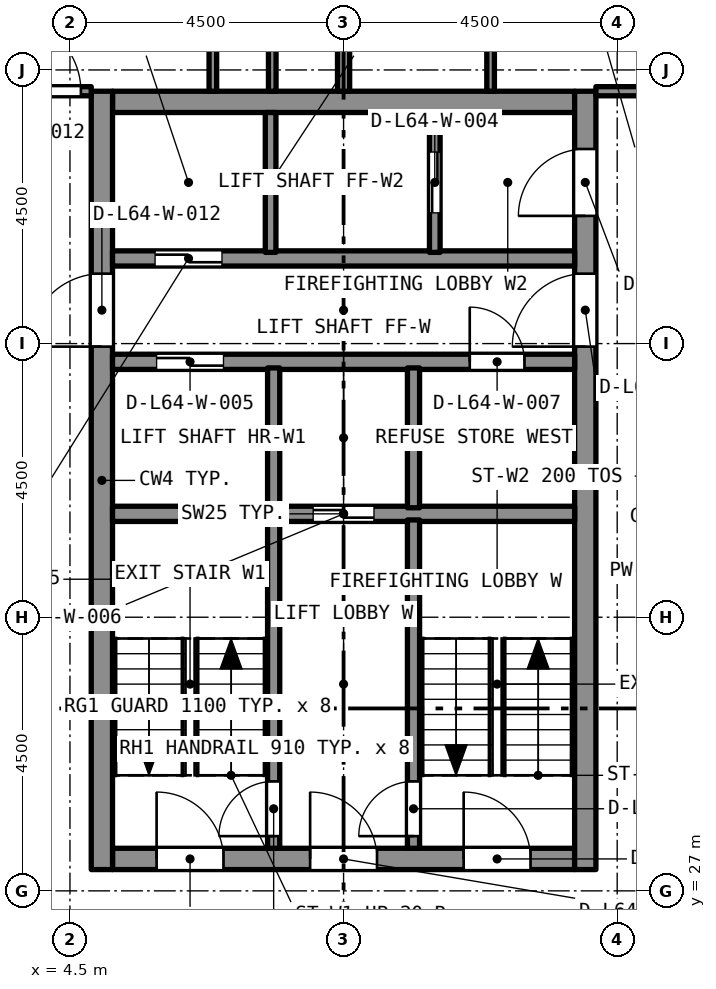
"""IFC4 building model, lengths in metres.
Left out: names, types, materials, properties, quantities, classifications, styles, units other than length and angle.
Written with IfcOpenShell. Run it as: python <this file> out.ifc"""

import sys

from ifc_helpers import new_model, si_unit, direction, frame, frame_2d, origin, place, context, subcontext, project, spatial, rectangle, extrude, element, fill, save


model = new_model("IFC4")
c1 = context("Model", 3, precision=1e-05, world=origin(), true_north=direction((0.0, 1.0)))
c2 = subcontext(c1, "Body", "Model", "MODEL_VIEW")
j1 = project(units=[si_unit("LENGTHUNIT", "METRE"), si_unit("PLANEANGLEUNIT", "RADIAN")], contexts=[c1])
p1 = place(None, origin())
s1 = spatial("IfcSite", under=j1, at=p1, CompositionType="ELEMENT")
p2 = place(p1, origin())
s2 = spatial("IfcBuilding", under=s1, at=p2, CompositionType="ELEMENT")
p3 = place(p2, frame((0.0, 0.0, 229.295)))
s3 = spatial("IfcBuildingStorey", under=s2, at=p3, CompositionType="ELEMENT", Elevation=229.295)
p4 = place(p3, frame((5.2, 27.525, 0.0), z_axis=(0.0, 0.0, 1.0), x_axis=(1.0, 0.0, 0.0)))
e1 = element("IfcWall", 1, at=p4, inside=s3, PredefinedType="SOLIDWALL", context=c2, shape_type="SweptSolid", body=[
    extrude(rectangle(XDim=7.6, YDim=0.35, at=frame_2d((3.8, 0.0))), origin(), (0.0, 0.0, 1.0), 3.2),
])
p5 = place(p4, frame((0.725, 0.0, 0.0)))
e2 = element("IfcOpeningElement", 2, at=p5, cuts=e1, PredefinedType="OPENING", context=c2, shape_type="SweptSolid", body=[
    extrude(rectangle(XDim=1.1, YDim=2.1, at=frame_2d((0.55, 1.05))), frame((0.0, 0.185, 0.0), z_axis=(0.0, -1.0, 0.0), x_axis=(1.0, 0.0, 0.0)), (0.0, 0.0, 1.0), 0.37),
])
p6 = place(p4, frame((3.25, 0.0, 0.0)))
e3 = element("IfcOpeningElement", 3, at=p6, cuts=e1, PredefinedType="OPENING", context=c2, shape_type="SweptSolid", body=[
    extrude(rectangle(XDim=1.1, YDim=2.1, at=frame_2d((0.55, 1.05))), frame((0.0, 0.185, 0.0), z_axis=(0.0, -1.0, 0.0), x_axis=(1.0, 0.0, 0.0)), (0.0, 0.0, 1.0), 0.37),
])
p7 = place(p4, frame((5.775, 0.0, 0.0)))
e4 = element("IfcOpeningElement", 4, at=p7, cuts=e1, PredefinedType="OPENING", context=c2, shape_type="SweptSolid", body=[
    extrude(rectangle(XDim=1.1, YDim=2.1, at=frame_2d((0.55, 1.05))), frame((0.0, 0.185, 0.0), z_axis=(0.0, -1.0, 0.0), x_axis=(1.0, 0.0, 0.0)), (0.0, 0.0, 1.0), 0.37),
])
p8 = place(p3, frame((5.2, 39.975, 0.0), z_axis=(0.0, 0.0, 1.0), x_axis=(1.0, 0.0, 0.0)))
e5 = element("IfcWall", 5, at=p8, inside=s3, PredefinedType="SOLIDWALL", context=c2, shape_type="SweptSolid", body=[
    extrude(rectangle(XDim=7.6, YDim=0.35, at=frame_2d((3.8, 0.0))), origin(), (0.0, 0.0, 1.0), 3.2),
])
p9 = place(p3, frame((5.025, 27.35, 0.0), z_axis=(0.0, 0.0, 1.0), x_axis=(0.0, 1.0, 0.0)))
e6 = element("IfcWall", 6, at=p9, inside=s3, PredefinedType="SOLIDWALL", context=c2, shape_type="SweptSolid", body=[
    extrude(rectangle(XDim=12.8, YDim=0.35, at=frame_2d((6.4, 0.0))), origin(), (0.0, 0.0, 1.0), 3.2),
])
p10 = place(p9, frame((8.6, 0.0, 0.0)))
e7 = element("IfcOpeningElement", 7, at=p10, cuts=e6, PredefinedType="OPENING", context=c2, shape_type="SweptSolid", body=[
    extrude(rectangle(XDim=1.2, YDim=2.1, at=frame_2d((0.6, 1.05))), frame((0.0, 0.185, 0.0), z_axis=(0.0, -1.0, 0.0), x_axis=(1.0, 0.0, 0.0)), (0.0, 0.0, 1.0), 0.37),
])
p11 = place(p3, frame((12.975, 27.35, 0.0), z_axis=(0.0, 0.0, 1.0), x_axis=(0.0, 1.0, 0.0)))
e8 = element("IfcWall", 8, at=p11, inside=s3, PredefinedType="SOLIDWALL", context=c2, shape_type="SweptSolid", body=[
    extrude(rectangle(XDim=12.8, YDim=0.35, at=frame_2d((6.4, 0.0))), origin(), (0.0, 0.0, 1.0), 3.2),
])
p12 = place(p11, frame((10.75, 0.0, 0.0)))
e9 = element("IfcOpeningElement", 9, at=p12, cuts=e8, PredefinedType="OPENING", context=c2, shape_type="SweptSolid", body=[
    extrude(rectangle(XDim=1.1, YDim=2.1, at=frame_2d((0.55, 1.05))), frame((0.0, 0.185, 0.0), z_axis=(0.0, -1.0, 0.0), x_axis=(1.0, 0.0, 0.0)), (0.0, 0.0, 1.0), 0.37),
])
p13 = place(p11, frame((8.6, 0.0, 0.0)))
e10 = element("IfcOpeningElement", 10, at=p13, cuts=e8, PredefinedType="OPENING", context=c2, shape_type="SweptSolid", body=[
    extrude(rectangle(XDim=1.2, YDim=2.1, at=frame_2d((0.6, 1.05))), frame((0.0, 0.185, 0.0), z_axis=(0.0, -1.0, 0.0), x_axis=(1.0, 0.0, 0.0)), (0.0, 0.0, 1.0), 0.37),
])
p14 = place(p3, frame((6.85, 43.683, 0.0), z_axis=(0.0, 0.0, 1.0), x_axis=(0.0, -1.0, 0.0)))
e11 = element("IfcWall", 11, at=p14, inside=s3, PredefinedType="PARTITIONING", context=c2, shape_type="SweptSolid", body=[
    extrude(rectangle(XDim=3.533, YDim=0.125, at=frame_2d((1.766, 0.0))), origin(), (0.0, 0.0, 1.0), 2.9),
])
p15 = place(p14, frame((0.183, 0.0, 0.0)))
e12 = element("IfcOpeningElement", 12, at=p15, cuts=e11, PredefinedType="OPENING", context=c2, shape_type="SweptSolid", body=[
    extrude(rectangle(XDim=0.8, YDim=2.1, at=frame_2d((0.4, 1.05))), frame((0.0, 0.073, 0.0), z_axis=(0.0, -1.0, 0.0), x_axis=(1.0, 0.0, 0.0)), (0.0, 0.0, 1.0), 0.145),
])
p16 = place(p3, frame((7.827, 40.15, 0.0), z_axis=(0.0, 0.0, 1.0), x_axis=(0.0, 1.0, 0.0)))
e13 = element("IfcWall", 13, at=p16, inside=s3, PredefinedType="PARTITIONING", context=c2, shape_type="SweptSolid", body=[
    extrude(rectangle(XDim=3.408, YDim=0.125, at=frame_2d((1.704, 0.0))), origin(), (0.0, 0.0, 1.0), 2.9),
])
p17 = place(p3, frame((3.35, 40.15, 0.0), z_axis=(0.0, 0.0, 1.0), x_axis=(1.0, 0.0, 0.0)))
e14 = element("IfcWall", 14, at=p17, inside=s3, PredefinedType="PARTITIONING", context=c2, shape_type="SweptSolid", body=[
    extrude(rectangle(XDim=1.5, YDim=0.15, at=frame_2d((0.75, 0.0))), origin(), (0.0, 0.0, 1.0), 2.9),
])
p18 = place(p17, frame((0.13, 0.0, 0.0)))
e15 = element("IfcOpeningElement", 15, at=p18, cuts=e14, PredefinedType="OPENING", context=c2, shape_type="SweptSolid", body=[
    extrude(rectangle(XDim=1.2, YDim=2.4, at=frame_2d((0.6, 1.2))), frame((0.0, 0.085, 0.0), z_axis=(0.0, -1.0, 0.0), x_axis=(1.0, 0.0, 0.0)), (0.0, 0.0, 1.0), 0.17),
])
p19 = place(p3, frame((9.0, 40.15, 0.0), z_axis=(0.0, 0.0, 1.0), x_axis=(0.0, 1.0, 0.0)))
e16 = element("IfcWall", 16, at=p19, inside=s3, PredefinedType="PARTITIONING", context=c2, shape_type="SweptSolid", body=[
    extrude(rectangle(XDim=8.95, YDim=0.2, at=frame_2d((4.475, 0.0))), origin(), (0.0, 0.0, 1.0), 2.9),
])
p20 = place(p3, frame((11.418, 40.15, 0.0), z_axis=(0.0, 0.0, 1.0), x_axis=(0.0, 1.0, 0.0)))
e17 = element("IfcWall", 17, at=p20, inside=s3, PredefinedType="PARTITIONING", context=c2, shape_type="SweptSolid", body=[
    extrude(rectangle(XDim=2.248, YDim=0.125, at=frame_2d((1.124, 0.0))), origin(), (0.0, 0.0, 1.0), 2.9),
])
p21 = place(p3, frame((13.15, 40.15, 0.0), z_axis=(0.0, 0.0, 1.0), x_axis=(1.0, 0.0, 0.0)))
e18 = element("IfcWall", 18, at=p21, inside=s3, PredefinedType="PARTITIONING", context=c2, shape_type="SweptSolid", body=[
    extrude(rectangle(XDim=1.8, YDim=0.15, at=frame_2d((0.9, 0.0))), origin(), (0.0, 0.0, 1.0), 2.9),
])
p22 = place(p3, frame((5.2, 33.2, 0.0), z_axis=(0.0, 0.0, 1.0), x_axis=(1.0, 0.0, 0.0)))
e19 = element("IfcWall", 19, at=p22, inside=s3, PredefinedType="SOLIDWALL", context=c2, shape_type="SweptSolid", body=[
    extrude(rectangle(XDim=7.6, YDim=0.25, at=frame_2d((3.8, 0.0))), origin(), (0.0, 0.0, 1.0), 2.9),
])
p23 = place(p22, frame((3.3, 0.0, 0.0)))
e20 = element("IfcOpeningElement", 20, at=p23, cuts=e19, PredefinedType="OPENING", context=c2, shape_type="SweptSolid", body=[
    extrude(rectangle(XDim=1.0, YDim=2.1, at=frame_2d((0.5, 1.05))), frame((0.0, 0.135, 0.0), z_axis=(0.0, -1.0, 0.0), x_axis=(1.0, 0.0, 0.0)), (0.0, 0.0, 1.0), 0.27),
])
p24 = place(p3, frame((5.2, 35.7, 0.0), z_axis=(0.0, 0.0, 1.0), x_axis=(1.0, 0.0, 0.0)))
e21 = element("IfcWall", 21, at=p24, inside=s3, PredefinedType="SOLIDWALL", context=c2, shape_type="SweptSolid", body=[
    extrude(rectangle(XDim=7.6, YDim=0.25, at=frame_2d((3.8, 0.0))), origin(), (0.0, 0.0, 1.0), 2.9),
])
p25 = place(p24, frame((0.725, 0.0, 0.0)))
e22 = element("IfcOpeningElement", 22, at=p25, cuts=e21, PredefinedType="OPENING", context=c2, shape_type="SweptSolid", body=[
    extrude(rectangle(XDim=1.1, YDim=2.4, at=frame_2d((0.55, 1.2))), frame((0.0, 0.135, 0.0), z_axis=(0.0, -1.0, 0.0), x_axis=(1.0, 0.0, 0.0)), (0.0, 0.0, 1.0), 0.27),
])
p26 = place(p24, frame((5.875, 0.0, 0.0)))
e23 = element("IfcOpeningElement", 23, at=p26, cuts=e21, PredefinedType="OPENING", context=c2, shape_type="SweptSolid", body=[
    extrude(rectangle(XDim=0.9, YDim=2.1, at=frame_2d((0.45, 1.05))), frame((0.0, 0.135, 0.0), z_axis=(0.0, -1.0, 0.0), x_axis=(1.0, 0.0, 0.0)), (0.0, 0.0, 1.0), 0.27),
])
p27 = place(p3, frame((5.2, 37.4, 0.0), z_axis=(0.0, 0.0, 1.0), x_axis=(1.0, 0.0, 0.0)))
e24 = element("IfcWall", 24, at=p27, inside=s3, PredefinedType="SOLIDWALL", context=c2, shape_type="SweptSolid", body=[
    extrude(rectangle(XDim=7.6, YDim=0.25, at=frame_2d((3.8, 0.0))), origin(), (0.0, 0.0, 1.0), 2.9),
])
p28 = place(p27, frame((0.7, 0.0, 0.0)))
e25 = element("IfcOpeningElement", 25, at=p28, cuts=e24, PredefinedType="OPENING", context=c2, shape_type="SweptSolid", body=[
    extrude(rectangle(XDim=1.1, YDim=2.4, at=frame_2d((0.55, 1.2))), frame((0.0, 0.135, 0.0), z_axis=(0.0, -1.0, 0.0), x_axis=(1.0, 0.0, 0.0)), (0.0, 0.0, 1.0), 0.27),
])
p29 = place(p3, frame((7.85, 27.7, 0.0), z_axis=(0.0, 0.0, 1.0), x_axis=(0.0, 1.0, 0.0)))
e26 = element("IfcWall", 26, at=p29, inside=s3, PredefinedType="SOLIDWALL", context=c2, shape_type="SweptSolid", body=[
    extrude(rectangle(XDim=5.4, YDim=0.2, at=frame_2d((2.7, 0.0))), origin(), (0.0, 0.0, 1.0), 2.9),
])
p30 = place(p29, frame((0.2, 0.0, 0.0)))
e27 = element("IfcOpeningElement", 27, at=p30, cuts=e26, PredefinedType="OPENING", context=c2, shape_type="SweptSolid", body=[
    extrude(rectangle(XDim=0.9, YDim=2.1, at=frame_2d((0.45, 1.05))), frame((0.0, 0.11, 0.0), z_axis=(0.0, -1.0, 0.0), x_axis=(1.0, 0.0, 0.0)), (0.0, 0.0, 1.0), 0.22),
])
p31 = place(p3, frame((10.15, 27.7, 0.0), z_axis=(0.0, 0.0, 1.0), x_axis=(0.0, 1.0, 0.0)))
e28 = element("IfcWall", 28, at=p31, inside=s3, PredefinedType="SOLIDWALL", context=c2, shape_type="SweptSolid", body=[
    extrude(rectangle(XDim=5.4, YDim=0.2, at=frame_2d((2.7, 0.0))), origin(), (0.0, 0.0, 1.0), 2.9),
])
p32 = place(p31, frame((0.2, 0.0, 0.0)))
e29 = element("IfcOpeningElement", 29, at=p32, cuts=e28, PredefinedType="OPENING", context=c2, shape_type="SweptSolid", body=[
    extrude(rectangle(XDim=0.9, YDim=2.1, at=frame_2d((0.45, 1.05))), frame((0.0, 0.11, 0.0), z_axis=(0.0, -1.0, 0.0), x_axis=(1.0, 0.0, 0.0)), (0.0, 0.0, 1.0), 0.22),
])
for number, where, z_axis, x_axis in (
    (30, (7.85, 33.3, 0.0), (0.0, 0.0, 1.0), (0.0, 1.0, 0.0)),
    (31, (10.15, 33.3, 0.0), (0.0, 0.0, 1.0), (0.0, 1.0, 0.0)),
):
    element("IfcWall", number, at=place(p3, frame(where, z_axis=z_axis, x_axis=x_axis)), inside=s3, PredefinedType="SOLIDWALL", context=c2, shape_type="SweptSolid", body=[
        extrude(rectangle(XDim=2.3, YDim=0.2, at=frame_2d((1.15, 0.0))), origin(), (0.0, 0.0, 1.0), 2.9),
    ])
p33 = place(p3, frame((7.8, 37.5, 0.0), z_axis=(0.0, 0.0, 1.0), x_axis=(0.0, 1.0, 0.0)))
e32 = element("IfcWall", 32, at=p33, inside=s3, PredefinedType="SOLIDWALL", context=c2, shape_type="SweptSolid", body=[
    extrude(rectangle(XDim=2.3, YDim=0.175, at=frame_2d((1.15, 0.0))), origin(), (0.0, 0.0, 1.0), 2.9),
])
p34 = place(p3, frame((10.5, 37.5, 0.0), z_axis=(0.0, 0.0, 1.0), x_axis=(0.0, 1.0, 0.0)))
e33 = element("IfcWall", 33, at=p34, inside=s3, PredefinedType="SOLIDWALL", context=c2, shape_type="SweptSolid", body=[
    extrude(rectangle(XDim=2.3, YDim=0.175, at=frame_2d((1.15, 0.0))), origin(), (0.0, 0.0, 1.0), 2.9),
])
p35 = place(p34, frame((0.65, 0.0, 0.0)))
e34 = element("IfcOpeningElement", 34, at=p35, cuts=e33, PredefinedType="OPENING", context=c2, shape_type="SweptSolid", body=[
    extrude(rectangle(XDim=1.0, YDim=2.1, at=frame_2d((0.5, 1.05))), frame((0.0, 0.097, 0.0), z_axis=(0.0, -1.0, 0.0), x_axis=(1.0, 0.0, 0.0)), (0.0, 0.0, 1.0), 0.195),
])
p36 = place(p18, origin())
e35 = element("IfcDoor", 35, at=p36, inside=s3, OperationType="SINGLE_SWING_LEFT", PredefinedType="DOOR", context=c2, shape_type="SweptSolid", body=[
    extrude(rectangle(XDim=1.2, YDim=2.4, at=frame_2d((0.6, 1.2))), frame((0.0, 0.025, 0.0), z_axis=(0.0, -1.0, 0.0), x_axis=(1.0, 0.0, 0.0)), (0.0, 0.0, 1.0), 0.05),
])
fill(e15, e35)
p37 = place(p30, origin())
e36 = element("IfcDoor", 36, at=p37, inside=s3, OperationType="SINGLE_SWING_LEFT", PredefinedType="DOOR", context=c2, shape_type="SweptSolid", body=[
    extrude(rectangle(XDim=0.9, YDim=2.1, at=frame_2d((0.45, 1.05))), frame((0.0, 0.025, 0.0), z_axis=(0.0, -1.0, 0.0), x_axis=(1.0, 0.0, 0.0)), (0.0, 0.0, 1.0), 0.05),
])
fill(e27, e36)
p38 = place(p32, origin())
e37 = element("IfcDoor", 37, at=p38, inside=s3, OperationType="SINGLE_SWING_LEFT", PredefinedType="DOOR", context=c2, shape_type="SweptSolid", body=[
    extrude(rectangle(XDim=0.9, YDim=2.1, at=frame_2d((0.45, 1.05))), frame((0.0, 0.025, 0.0), z_axis=(0.0, -1.0, 0.0), x_axis=(1.0, 0.0, 0.0)), (0.0, 0.0, 1.0), 0.05),
])
fill(e29, e37)
p39 = place(p28, origin())
e38 = element("IfcDoor", 38, at=p39, inside=s3, OperationType="SLIDING_TO_LEFT", PredefinedType="DOOR", context=c2, shape_type="SweptSolid", body=[
    extrude(rectangle(XDim=1.1, YDim=2.4, at=frame_2d((0.55, 1.2))), frame((0.0, 0.025, 0.0), z_axis=(0.0, -1.0, 0.0), x_axis=(1.0, 0.0, 0.0)), (0.0, 0.0, 1.0), 0.05),
])
fill(e25, e38)
p40 = place(p35, origin())
e39 = element("IfcDoor", 39, at=p40, inside=s3, OperationType="SLIDING_TO_LEFT", PredefinedType="DOOR", context=c2, shape_type="SweptSolid", body=[
    extrude(rectangle(XDim=1.0, YDim=2.1, at=frame_2d((0.5, 1.05))), frame((0.0, 0.025, 0.0), z_axis=(0.0, -1.0, 0.0), x_axis=(1.0, 0.0, 0.0)), (0.0, 0.0, 1.0), 0.05),
])
fill(e34, e39)
p41 = place(p25, origin())
e40 = element("IfcDoor", 40, at=p41, inside=s3, OperationType="SLIDING_TO_LEFT", PredefinedType="DOOR", context=c2, shape_type="SweptSolid", body=[
    extrude(rectangle(XDim=1.1, YDim=2.4, at=frame_2d((0.55, 1.2))), frame((0.0, 0.025, 0.0), z_axis=(0.0, -1.0, 0.0), x_axis=(1.0, 0.0, 0.0)), (0.0, 0.0, 1.0), 0.05),
])
fill(e22, e40)
p42 = place(p23, origin())
e41 = element("IfcDoor", 41, at=p42, inside=s3, OperationType="SLIDING_TO_LEFT", PredefinedType="DOOR", context=c2, shape_type="SweptSolid", body=[
    extrude(rectangle(XDim=1.0, YDim=2.1, at=frame_2d((0.5, 1.05))), frame((0.0, 0.025, 0.0), z_axis=(0.0, -1.0, 0.0), x_axis=(1.0, 0.0, 0.0)), (0.0, 0.0, 1.0), 0.05),
])
fill(e20, e41)
p43 = place(p26, origin())
e42 = element("IfcDoor", 42, at=p43, inside=s3, OperationType="SINGLE_SWING_LEFT", PredefinedType="DOOR", context=c2, shape_type="SweptSolid", body=[
    extrude(rectangle(XDim=0.9, YDim=2.1, at=frame_2d((0.45, 1.05))), frame((0.0, 0.025, 0.0), z_axis=(0.0, -1.0, 0.0), x_axis=(1.0, 0.0, 0.0)), (0.0, 0.0, 1.0), 0.05),
])
fill(e23, e42)
p44 = place(p5, origin())
e43 = element("IfcDoor", 43, at=p44, inside=s3, OperationType="SINGLE_SWING_LEFT", PredefinedType="DOOR", context=c2, shape_type="SweptSolid", body=[
    extrude(rectangle(XDim=1.1, YDim=2.1, at=frame_2d((0.55, 1.05))), frame((0.0, 0.025, 0.0), z_axis=(0.0, -1.0, 0.0), x_axis=(1.0, 0.0, 0.0)), (0.0, 0.0, 1.0), 0.05),
])
fill(e2, e43)
p45 = place(p6, origin())
e44 = element("IfcDoor", 44, at=p45, inside=s3, OperationType="SINGLE_SWING_LEFT", PredefinedType="DOOR", context=c2, shape_type="SweptSolid", body=[
    extrude(rectangle(XDim=1.1, YDim=2.1, at=frame_2d((0.55, 1.05))), frame((0.0, 0.025, 0.0), z_axis=(0.0, -1.0, 0.0), x_axis=(1.0, 0.0, 0.0)), (0.0, 0.0, 1.0), 0.05),
])
fill(e3, e44)
p46 = place(p7, origin())
e45 = element("IfcDoor", 45, at=p46, inside=s3, OperationType="SINGLE_SWING_LEFT", PredefinedType="DOOR", context=c2, shape_type="SweptSolid", body=[
    extrude(rectangle(XDim=1.1, YDim=2.1, at=frame_2d((0.55, 1.05))), frame((0.0, 0.025, 0.0), z_axis=(0.0, -1.0, 0.0), x_axis=(1.0, 0.0, 0.0)), (0.0, 0.0, 1.0), 0.05),
])
fill(e4, e45)
p47 = place(p12, origin())
e46 = element("IfcDoor", 46, at=p47, inside=s3, OperationType="SINGLE_SWING_LEFT", PredefinedType="DOOR", context=c2, shape_type="SweptSolid", body=[
    extrude(rectangle(XDim=1.1, YDim=2.1, at=frame_2d((0.55, 1.05))), frame((0.0, 0.025, 0.0), z_axis=(0.0, -1.0, 0.0), x_axis=(1.0, 0.0, 0.0)), (0.0, 0.0, 1.0), 0.05),
])
fill(e9, e46)
p48 = place(p10, origin())
e47 = element("IfcDoor", 47, at=p48, inside=s3, OperationType="SINGLE_SWING_LEFT", PredefinedType="DOOR", context=c2, shape_type="SweptSolid", body=[
    extrude(rectangle(XDim=1.2, YDim=2.1, at=frame_2d((0.6, 1.05))), frame((0.0, 0.025, 0.0), z_axis=(0.0, -1.0, 0.0), x_axis=(1.0, 0.0, 0.0)), (0.0, 0.0, 1.0), 0.05),
])
fill(e7, e47)
p49 = place(p13, origin())
e48 = element("IfcDoor", 48, at=p49, inside=s3, OperationType="SINGLE_SWING_LEFT", PredefinedType="DOOR", context=c2, shape_type="SweptSolid", body=[
    extrude(rectangle(XDim=1.2, YDim=2.1, at=frame_2d((0.6, 1.05))), frame((0.0, 0.025, 0.0), z_axis=(0.0, -1.0, 0.0), x_axis=(1.0, 0.0, 0.0)), (0.0, 0.0, 1.0), 0.05),
])
fill(e10, e48)
save(model, sys.argv[1])
